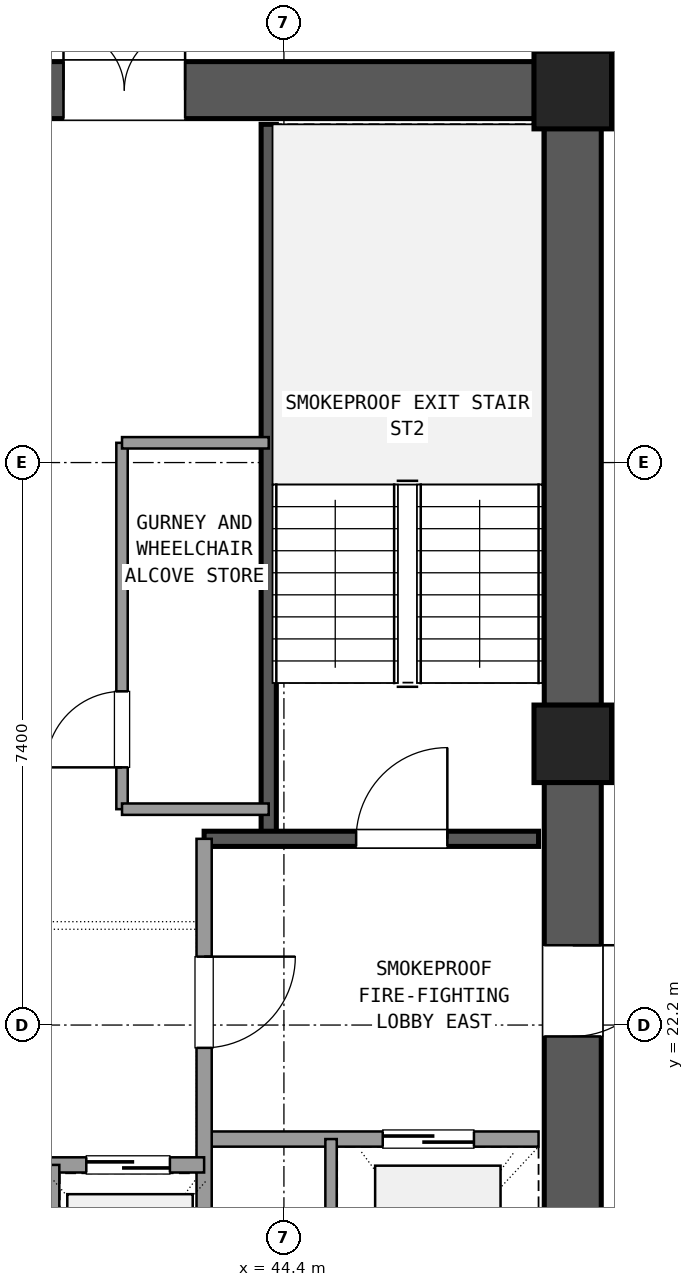
"""IFC4 building model, lengths in metres.
Left out: names, types, materials, properties, quantities, classifications, styles, units other than length and angle.
Written with IfcOpenShell. Run it as: python <this file> out.ifc"""

import sys

from ifc_helpers import new_model, si_unit, direction, frame, frame_2d, origin, origin_2d, place, context, subcontext, project, spatial, rectangle, extrude, element, fill, save


model = new_model("IFC4")
c1 = context("Model", 3, precision=1e-05, world=origin(), true_north=direction((0.0, 1.0)))
c2 = subcontext(c1, "Body", "Model", "MODEL_VIEW")
j1 = project(units=[si_unit("LENGTHUNIT", "METRE"), si_unit("PLANEANGLEUNIT", "RADIAN")], contexts=[c1])
p1 = place(None, origin())
s1 = spatial("IfcSite", under=j1, at=p1, CompositionType="ELEMENT")
p2 = place(p1, origin())
s2 = spatial("IfcBuilding", under=s1, at=p2, CompositionType="ELEMENT")
p3 = place(p2, frame((0.0, 0.0, 142.02)))
s3 = spatial("IfcBuildingStorey", under=s2, at=p3, CompositionType="ELEMENT", Elevation=142.02)
for number, where, z_axis, x_axis in (
    (1, (48.2, 25.9, 0.0), (0.0, 0.0, 1.0), (1.0, 0.0, 0.0)),
    (2, (48.2, 34.5, 0.0), (0.0, 0.0, 1.0), (1.0, 0.0, 0.0)),
):
    element("IfcColumn", number, at=place(p3, frame(where, z_axis=z_axis, x_axis=x_axis)), inside=s3, PredefinedType="COLUMN", context=c2, shape_type="SweptSolid", body=[
        extrude(rectangle(XDim=1.02, YDim=1.02, at=origin_2d()), origin(), (0.0, 0.0, 1.0), 3.6),
    ])
p4 = place(p3, frame((48.2, 17.805, 0.0), z_axis=(0.0, 0.0, 1.0), x_axis=(0.0, 1.0, 0.0)))
e3 = element("IfcWall", 3, at=p4, inside=s3, PredefinedType="SHEAR", context=c2, shape_type="SweptSolid", body=[
    extrude(rectangle(XDim=7.59, YDim=0.75, at=frame_2d((3.795, 0.0))), origin(), (0.0, 0.0, 1.0), 3.32),
])
p5 = place(p4, frame((4.245, 0.0, 0.0)))
e4 = element("IfcOpeningElement", 4, at=p5, cuts=e3, PredefinedType="OPENING", context=c2, shape_type="SweptSolid", body=[
    extrude(rectangle(XDim=1.2, YDim=2.15, at=frame_2d((0.6, 1.075))), frame((0.0, 0.385, 0.0), z_axis=(0.0, -1.0, 0.0), x_axis=(1.0, 0.0, 0.0)), (0.0, 0.0, 1.0), 0.77),
])
p6 = place(p3, frame((48.2, 26.405, 0.0), z_axis=(0.0, 0.0, 1.0), x_axis=(0.0, 1.0, 0.0)))
e5 = element("IfcWall", 5, at=p6, inside=s3, PredefinedType="SHEAR", context=c2, shape_type="SweptSolid", body=[
    extrude(rectangle(XDim=7.59, YDim=0.75, at=frame_2d((3.795, 0.0))), origin(), (0.0, 0.0, 1.0), 3.32),
])
p7 = place(p3, frame((47.695, 34.5, 0.0), z_axis=(0.0, 0.0, 1.0), x_axis=(-1.0, 0.0, 0.0)))
e6 = element("IfcWall", 6, at=p7, inside=s3, PredefinedType="SHEAR", context=c2, shape_type="SweptSolid", body=[
    extrude(rectangle(XDim=10.19, YDim=0.75, at=frame_2d((5.095, 0.0))), origin(), (0.0, 0.0, 1.0), 3.32),
])
p8 = place(p7, frame((4.595, 0.0, 0.0)))
e7 = element("IfcOpeningElement", 7, at=p8, cuts=e6, PredefinedType="OPENING", context=c2, shape_type="SweptSolid", body=[
    extrude(rectangle(XDim=1.6, YDim=2.2, at=frame_2d((0.8, 1.1))), frame((0.0, 0.385, 0.0), z_axis=(0.0, -1.0, 0.0), x_axis=(1.0, 0.0, 0.0)), (0.0, 0.0, 1.0), 0.77),
])
p9 = place(p3, frame((44.2, 24.65, 0.0), z_axis=(0.0, 0.0, 1.0), x_axis=(0.0, 1.0, 0.0)))
e8 = element("IfcWall", 8, at=p9, inside=s3, PredefinedType="SHEAR", context=c2, shape_type="SweptSolid", body=[
    extrude(rectangle(XDim=9.4, YDim=0.2, at=frame_2d((4.7, 0.0))), origin(), (0.0, 0.0, 1.0), 3.32),
])
p10 = place(p3, frame((43.35, 24.65, 0.0), z_axis=(0.0, 0.0, 1.0), x_axis=(1.0, 0.0, 0.0)))
e9 = element("IfcWall", 9, at=p10, inside=s3, PredefinedType="SHEAR", context=c2, shape_type="SweptSolid", body=[
    extrude(rectangle(XDim=4.4, YDim=0.2, at=frame_2d((2.2, 0.0))), origin(), (0.0, 0.0, 1.0), 3.32),
])
p11 = place(p10, frame((2.0, 0.0, 0.0)))
e10 = element("IfcOpeningElement", 10, at=p11, cuts=e9, PredefinedType="OPENING", context=c2, shape_type="SweptSolid", body=[
    extrude(rectangle(XDim=1.2, YDim=2.15, at=frame_2d((0.6, 1.075))), frame((0.0, 0.11, 0.0), z_axis=(0.0, -1.0, 0.0), x_axis=(1.0, 0.0, 0.0)), (0.0, 0.0, 1.0), 0.22),
])
p12 = place(p3, frame((43.35, 20.7, 0.0), z_axis=(0.0, 0.0, 1.0), x_axis=(1.0, 0.0, 0.0)))
e11 = element("IfcWall", 11, at=p12, inside=s3, PredefinedType="SOLIDWALL", context=c2, shape_type="SweptSolid", body=[
    extrude(rectangle(XDim=4.4, YDim=0.2, at=frame_2d((2.2, 0.0))), origin(), (0.0, 0.0, 1.0), 2.61),
])
p13 = place(p12, frame((2.35, 0.0, 0.0)))
e12 = element("IfcOpeningElement", 12, at=p13, cuts=e11, PredefinedType="OPENING", context=c2, shape_type="SweptSolid", body=[
    extrude(rectangle(XDim=1.2, YDim=2.15, at=frame_2d((0.6, 1.075))), frame((0.0, 0.11, 0.0), z_axis=(0.0, -1.0, 0.0), x_axis=(1.0, 0.0, 0.0)), (0.0, 0.0, 1.0), 0.22),
])
p14 = place(p3, frame((43.35, 17.75, 0.0), z_axis=(0.0, 0.0, 1.0), x_axis=(0.0, 1.0, 0.0)))
e13 = element("IfcWall", 13, at=p14, inside=s3, PredefinedType="SOLIDWALL", context=c2, shape_type="SweptSolid", body=[
    extrude(rectangle(XDim=6.9, YDim=0.2, at=frame_2d((3.45, 0.0))), origin(), (0.0, 0.0, 1.0), 2.61),
])
p15 = place(p14, frame((4.15, 0.0, 0.0)))
e14 = element("IfcOpeningElement", 14, at=p15, cuts=e13, PredefinedType="OPENING", context=c2, shape_type="SweptSolid", body=[
    extrude(rectangle(XDim=1.2, YDim=2.15, at=frame_2d((0.6, 1.075))), frame((0.0, 0.11, 0.0), z_axis=(0.0, -1.0, 0.0), x_axis=(1.0, 0.0, 0.0)), (0.0, 0.0, 1.0), 0.22),
])
p16 = place(p3, frame((45.02, 17.75, 0.0), z_axis=(0.0, 0.0, 1.0), x_axis=(0.0, 1.0, 0.0)))
e15 = element("IfcWall", 15, at=p16, inside=s3, PredefinedType="PARTITIONING", context=c2, shape_type="SweptSolid", body=[
    extrude(rectangle(XDim=2.95, YDim=0.15, at=frame_2d((1.475, 0.0))), origin(), (0.0, 0.0, 1.0), 2.61),
])
p17 = place(p3, frame((37.25, 20.36, 0.0), z_axis=(0.0, 0.0, 1.0), x_axis=(1.0, 0.0, 0.0)))
e16 = element("IfcWall", 16, at=p17, inside=s3, PredefinedType="SOLIDWALL", context=c2, shape_type="SweptSolid", body=[
    extrude(rectangle(XDim=6.1, YDim=0.2, at=frame_2d((3.05, 0.0))), origin(), (0.0, 0.0, 1.0), 2.61),
])
p18 = place(p17, frame((0.45, 0.0, 0.0)))
e17 = element("IfcOpeningElement", 17, at=p18, cuts=e16, PredefinedType="OPENING", context=c2, shape_type="SweptSolid", body=[
    extrude(rectangle(XDim=1.1, YDim=2.15, at=frame_2d((0.55, 1.075))), frame((0.0, 0.11, 0.0), z_axis=(0.0, -1.0, 0.0), x_axis=(1.0, 0.0, 0.0)), (0.0, 0.0, 1.0), 0.22),
])
p19 = place(p17, frame((2.5, 0.0, 0.0)))
e18 = element("IfcOpeningElement", 18, at=p19, cuts=e16, PredefinedType="OPENING", context=c2, shape_type="SweptSolid", body=[
    extrude(rectangle(XDim=1.1, YDim=2.15, at=frame_2d((0.55, 1.075))), frame((0.0, 0.11, 0.0), z_axis=(0.0, -1.0, 0.0), x_axis=(1.0, 0.0, 0.0)), (0.0, 0.0, 1.0), 0.22),
])
p20 = place(p17, frame((4.55, 0.0, 0.0)))
e19 = element("IfcOpeningElement", 19, at=p20, cuts=e16, PredefinedType="OPENING", context=c2, shape_type="SweptSolid", body=[
    extrude(rectangle(XDim=1.1, YDim=2.15, at=frame_2d((0.55, 1.075))), frame((0.0, 0.11, 0.0), z_axis=(0.0, -1.0, 0.0), x_axis=(1.0, 0.0, 0.0)), (0.0, 0.0, 1.0), 0.22),
])
p21 = place(p3, frame((41.37, 17.75, 0.0), z_axis=(0.0, 0.0, 1.0), x_axis=(0.0, 1.0, 0.0)))
e20 = element("IfcWall", 20, at=p21, inside=s3, PredefinedType="PARTITIONING", context=c2, shape_type="SweptSolid", body=[
    extrude(rectangle(XDim=2.61, YDim=0.15, at=frame_2d((1.305, 0.0))), origin(), (0.0, 0.0, 1.0), 2.61),
])
p22 = place(p3, frame((42.27, 25.04, 0.0), z_axis=(0.0, 0.0, 1.0), x_axis=(0.0, 1.0, 0.0)))
e21 = element("IfcWall", 21, at=p22, inside=s3, PredefinedType="PARTITIONING", context=c2, shape_type="SweptSolid", body=[
    extrude(rectangle(XDim=4.82, YDim=0.15, at=frame_2d((2.41, 0.0))), origin(), (0.0, 0.0, 1.0), 2.61),
])
p23 = place(p22, frame((0.55, 0.0, 0.0)))
e22 = element("IfcOpeningElement", 22, at=p23, cuts=e21, PredefinedType="OPENING", context=c2, shape_type="SweptSolid", body=[
    extrude(rectangle(XDim=1.0, YDim=2.15, at=frame_2d((0.5, 1.075))), frame((0.0, 0.085, 0.0), z_axis=(0.0, -1.0, 0.0), x_axis=(1.0, 0.0, 0.0)), (0.0, 0.0, 1.0), 0.17),
])
for number, where, z_axis, x_axis in (
    (23, (42.27, 25.04, 0.0), (0.0, 0.0, 1.0), (1.0, 0.0, 0.0)),
    (24, (42.27, 29.86, 0.0), (0.0, 0.0, 1.0), (1.0, 0.0, 0.0)),
):
    element("IfcWall", number, at=place(p3, frame(where, z_axis=z_axis, x_axis=x_axis)), inside=s3, PredefinedType="PARTITIONING", context=c2, shape_type="SweptSolid", body=[
        extrude(rectangle(XDim=1.93, YDim=0.15, at=frame_2d((0.965, 0.0))), origin(), (0.0, 0.0, 1.0), 2.61),
    ])
p24 = place(p11, origin())
e25 = element("IfcDoor", 25, at=p24, inside=s3, OperationType="SINGLE_SWING_RIGHT", PredefinedType="DOOR", context=c2, shape_type="SweptSolid", body=[
    extrude(rectangle(XDim=1.2, YDim=2.15, at=frame_2d((0.6, 1.075))), frame((0.0, 0.025, 0.0), z_axis=(0.0, -1.0, 0.0), x_axis=(1.0, 0.0, 0.0)), (0.0, 0.0, 1.0), 0.05),
])
fill(e10, e25)
p25 = place(p13, origin())
e26 = element("IfcDoor", 26, at=p25, inside=s3, OperationType="SLIDING_TO_RIGHT", PredefinedType="DOOR", context=c2, shape_type="SweptSolid", body=[
    extrude(rectangle(XDim=1.2, YDim=2.15, at=frame_2d((0.6, 1.075))), frame((0.0, 0.025, 0.0), z_axis=(0.0, -1.0, 0.0), x_axis=(1.0, 0.0, 0.0)), (0.0, 0.0, 1.0), 0.05),
])
fill(e12, e26)
p26 = place(p15, frame((1.2, 0.0, 0.0), z_axis=(0.0, 0.0, 1.0), x_axis=(-1.0, 0.0, 0.0)))
e27 = element("IfcDoor", 27, at=p26, inside=s3, OperationType="SINGLE_SWING_RIGHT", PredefinedType="DOOR", context=c2, shape_type="SweptSolid", body=[
    extrude(rectangle(XDim=1.2, YDim=2.15, at=frame_2d((0.6, 1.075))), frame((0.0, 0.025, 0.0), z_axis=(0.0, -1.0, 0.0), x_axis=(1.0, 0.0, 0.0)), (0.0, 0.0, 1.0), 0.05),
])
fill(e14, e27)
p27 = place(p5, frame((1.2, 0.0, 0.0), z_axis=(0.0, 0.0, 1.0), x_axis=(-1.0, 0.0, 0.0)))
e28 = element("IfcDoor", 28, at=p27, inside=s3, OperationType="SINGLE_SWING_RIGHT", PredefinedType="DOOR", context=c2, shape_type="SweptSolid", body=[
    extrude(rectangle(XDim=1.2, YDim=2.15, at=frame_2d((0.6, 1.075))), frame((0.0, 0.025, 0.0), z_axis=(0.0, -1.0, 0.0), x_axis=(1.0, 0.0, 0.0)), (0.0, 0.0, 1.0), 0.05),
])
fill(e4, e28)
p28 = place(p8, frame((1.6, 0.0, 0.0), z_axis=(0.0, 0.0, 1.0), x_axis=(-1.0, 0.0, 0.0)))
e29 = element("IfcDoor", 29, at=p28, inside=s3, OperationType="DOUBLE_DOOR_SINGLE_SWING", PredefinedType="DOOR", context=c2, shape_type="SweptSolid", body=[
    extrude(rectangle(XDim=1.6, YDim=2.2, at=frame_2d((0.8, 1.1))), frame((0.0, 0.025, 0.0), z_axis=(0.0, -1.0, 0.0), x_axis=(1.0, 0.0, 0.0)), (0.0, 0.0, 1.0), 0.05),
])
fill(e7, e29)
p29 = place(p20, origin())
e30 = element("IfcDoor", 30, at=p29, inside=s3, OperationType="SLIDING_TO_LEFT", PredefinedType="DOOR", context=c2, shape_type="SweptSolid", body=[
    extrude(rectangle(XDim=1.1, YDim=2.15, at=frame_2d((0.55, 1.075))), frame((0.0, 0.025, 0.0), z_axis=(0.0, -1.0, 0.0), x_axis=(1.0, 0.0, 0.0)), (0.0, 0.0, 1.0), 0.05),
])
fill(e19, e30)
p30 = place(p23, origin())
e31 = element("IfcDoor", 31, at=p30, inside=s3, OperationType="SINGLE_SWING_LEFT", PredefinedType="DOOR", context=c2, shape_type="SweptSolid", body=[
    extrude(rectangle(XDim=1.0, YDim=2.15, at=frame_2d((0.5, 1.075))), frame((0.0, 0.025, 0.0), z_axis=(0.0, -1.0, 0.0), x_axis=(1.0, 0.0, 0.0)), (0.0, 0.0, 1.0), 0.05),
])
fill(e22, e31)
save(model, sys.argv[1])
